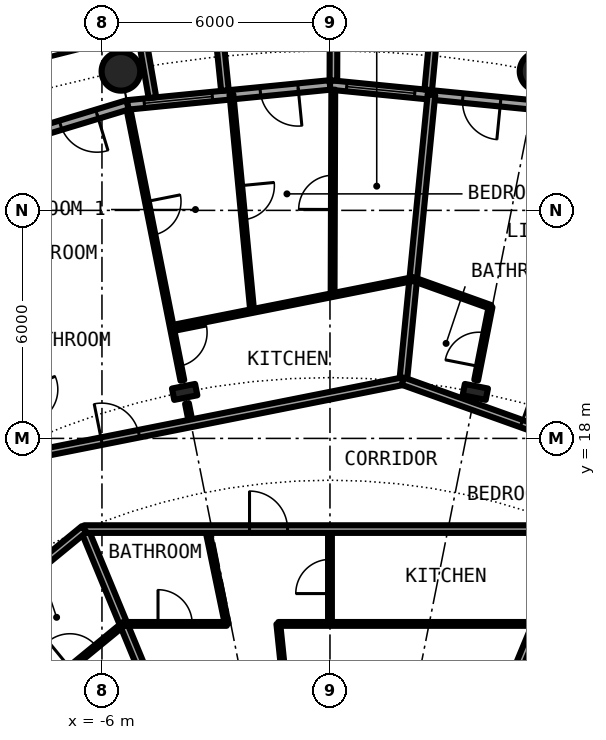
"""IFC4 building model, lengths in metres.
Left out: names, types, materials, properties, quantities, classifications, styles, units other than length and angle.
Written with IfcOpenShell. Run it as: python <this file> out.ifc"""

import sys

from ifc_helpers import new_model, si_unit, direction, frame, frame_2d, origin, origin_2d, place, context, subcontext, project, spatial, rectangle, hollow_circle, i_section, extrude, element, fill, save


model = new_model("IFC4")
c1 = context("Model", 3, precision=1e-05, world=origin(), true_north=direction((0.0, 1.0)))
c2 = subcontext(c1, "Body", "Model", "MODEL_VIEW")
j1 = project(units=[si_unit("LENGTHUNIT", "METRE"), si_unit("PLANEANGLEUNIT", "RADIAN")], contexts=[c1])
p1 = place(None, origin())
s1 = spatial("IfcSite", under=j1, at=p1, CompositionType="ELEMENT")
p2 = place(p1, origin())
s2 = spatial("IfcBuilding", under=s1, at=p2, CompositionType="ELEMENT")
p3 = place(p2, frame((0.0, 0.0, 35.0)))
s3 = spatial("IfcBuildingStorey", under=s2, at=p3, CompositionType="ELEMENT", Elevation=35.0)
for number, where, z_axis, x_axis in (
    (1, (5.501, 27.658, 0.0), (0.0, 0.0, 1.0), (1.0, 0.0, 0.0)),
    (2, (-5.501, 27.658, 0.0), (0.0, 0.0, 1.0), (1.0, 0.0, 0.0)),
):
    element("IfcColumn", number, at=place(p3, frame(where, z_axis=z_axis, x_axis=x_axis)), inside=s3, PredefinedType="COLUMN", context=c2, shape_type="SweptSolid", body=[
        extrude(hollow_circle(Radius=0.508, WallThickness=0.05, at=origin_2d()), origin(), (0.0, 0.0, 1.0), 3.05),
    ])
for number, where, z_axis, x_axis in (
    (3, (3.824, 19.223, 0.0), (0.0, 0.0, 1.0), (0.195, 0.981, 0.0)),
    (4, (-3.824, 19.223, 0.0), (0.0, 0.0, 1.0), (-0.195, 0.981, 0.0)),
):
    element("IfcColumn", number, at=place(p3, frame(where, z_axis=z_axis, x_axis=x_axis)), inside=s3, PredefinedType="COLUMN", context=c2, shape_type="SweptSolid", body=[
        extrude(i_section(OverallWidth=0.305, OverallDepth=0.62, WebThickness=0.021, FlangeThickness=0.04, FilletRadius=0.027, at=origin_2d()), origin(), (0.0, 0.0, 1.0), 3.05),
    ])
p4 = place(p3, frame((5.326, 26.775, 0.0), z_axis=(0.0, 0.0, 1.0), x_axis=(-0.995173996315, 0.098126026407, 0.0)))
e5 = element("IfcWall", 5, at=p4, inside=s3, PredefinedType="SOLIDWALL", context=c2, shape_type="SweptSolid", body=[
    extrude(rectangle(XDim=5.352, YDim=0.25, at=frame_2d((2.676, 0.0))), origin(), (0.0, 0.0, 1.0), 2.7),
])
p5 = place(p4, frame((0.841, 0.0, 0.0)))
e6 = element("IfcOpeningElement", 6, at=p5, cuts=e5, PredefinedType="OPENING", context=c2, shape_type="SweptSolid", body=[
    extrude(rectangle(XDim=1.0, YDim=2.2, at=frame_2d((0.5, 1.1))), frame((0.0, 0.135, 0.0), z_axis=(0.0, -1.0, 0.0), x_axis=(1.0, 0.0, 0.0)), (0.0, 0.0, 1.0), 0.27),
])
p6 = place(p4, frame((3.111, 0.0, 0.3)))
e7 = element("IfcOpeningElement", 7, at=p6, cuts=e5, PredefinedType="OPENING", context=c2, shape_type="SweptSolid", body=[
    extrude(rectangle(XDim=1.8, YDim=2.1, at=frame_2d((0.9, 1.05))), frame((0.0, 0.135, 0.0), z_axis=(0.0, -1.0, 0.0), x_axis=(1.0, 0.0, 0.0)), (0.0, 0.0, 1.0), 0.27),
])
p7 = place(p3, frame((2.586, 27.171, -0.03), z_axis=(0.0, 0.0, 1.0), x_axis=(0.094548432284, 0.995520262954, 0.0)))
e8 = element("IfcWall", 8, at=p7, inside=s3, PredefinedType="SOLIDWALL", context=c2, shape_type="SweptSolid", body=[
    extrude(rectangle(XDim=3.006, YDim=0.2, at=frame_2d((1.503, 0.0))), origin(), (0.0, 0.0, 1.0), 2.73),
])
p8 = place(p3, frame((0.09, 27.417, -0.03), z_axis=(0.0, 0.0, 1.0), x_axis=(0.00347308367, 0.999993968827, 0.0)))
e9 = element("IfcWall", 9, at=p8, inside=s3, PredefinedType="SOLIDWALL", context=c2, shape_type="SweptSolid", body=[
    extrude(rectangle(XDim=2.882, YDim=0.2, at=frame_2d((1.441, 0.0))), origin(), (0.0, 0.0, 1.0), 2.73),
])
p9 = place(p3, frame((0.0, 27.3, 0.0), z_axis=(0.0, 0.0, 1.0), x_axis=(-0.995173996315, -0.098126026407, 0.0)))
e10 = element("IfcWall", 10, at=p9, inside=s3, PredefinedType="SOLIDWALL", context=c2, shape_type="SweptSolid", body=[
    extrude(rectangle(XDim=5.352, YDim=0.25, at=frame_2d((2.676, 0.0))), origin(), (0.0, 0.0, 1.0), 2.7),
])
p10 = place(p9, frame((0.841, 0.0, 0.0)))
e11 = element("IfcOpeningElement", 11, at=p10, cuts=e10, PredefinedType="OPENING", context=c2, shape_type="SweptSolid", body=[
    extrude(rectangle(XDim=1.0, YDim=2.2, at=frame_2d((0.5, 1.1))), frame((0.0, 0.135, 0.0), z_axis=(0.0, -1.0, 0.0), x_axis=(1.0, 0.0, 0.0)), (0.0, 0.0, 1.0), 0.27),
])
p11 = place(p9, frame((3.111, 0.0, 0.3)))
e12 = element("IfcOpeningElement", 12, at=p11, cuts=e10, PredefinedType="OPENING", context=c2, shape_type="SweptSolid", body=[
    extrude(rectangle(XDim=1.8, YDim=2.1, at=frame_2d((0.9, 1.05))), frame((0.0, 0.135, 0.0), z_axis=(0.0, -1.0, 0.0), x_axis=(1.0, 0.0, 0.0)), (0.0, 0.0, 1.0), 0.27),
])
p12 = place(p3, frame((-2.764, 27.153, -0.03), z_axis=(0.0, 0.0, 1.0), x_axis=(-0.101505487237, 0.994834979311, 0.0)))
e13 = element("IfcWall", 13, at=p12, inside=s3, PredefinedType="SOLIDWALL", context=c2, shape_type="SweptSolid", body=[
    extrude(rectangle(XDim=3.007, YDim=0.2, at=frame_2d((1.503, 0.0))), origin(), (0.0, 0.0, 1.0), 2.73),
])
p13 = place(p3, frame((-4.671, 26.966, -0.03), z_axis=(0.0, 0.0, 1.0), x_axis=(-0.170539878907, 0.985350774954, 0.0)))
e14 = element("IfcWall", 14, at=p13, inside=s3, PredefinedType="SOLIDWALL", context=c2, shape_type="SweptSolid", body=[
    extrude(rectangle(XDim=2.932, YDim=0.2, at=frame_2d((1.466, 0.0))), origin(), (0.0, 0.0, 1.0), 2.73),
])
p14 = place(p3, frame((-5.326, 26.775, 0.0), z_axis=(0.0, 0.0, 1.0), x_axis=(-0.956965678721, -0.290201119486, 0.0)))
e15 = element("IfcWall", 15, at=p14, inside=s3, PredefinedType="SOLIDWALL", context=c2, shape_type="SweptSolid", body=[
    extrude(rectangle(XDim=5.351, YDim=0.25, at=frame_2d((2.676, 0.0))), origin(), (0.0, 0.0, 1.0), 2.7),
])
p15 = place(p14, frame((0.841, 0.0, 0.0)))
e16 = element("IfcOpeningElement", 16, at=p15, cuts=e15, PredefinedType="OPENING", context=c2, shape_type="SweptSolid", body=[
    extrude(rectangle(XDim=1.0, YDim=2.2, at=frame_2d((0.5, 1.1))), frame((0.0, 0.135, 0.0), z_axis=(0.0, -1.0, 0.0), x_axis=(1.0, 0.0, 0.0)), (0.0, 0.0, 1.0), 0.27),
])
p16 = place(p14, frame((3.111, 0.0, 0.3)))
e17 = element("IfcOpeningElement", 17, at=p16, cuts=e15, PredefinedType="OPENING", context=c2, shape_type="SweptSolid", body=[
    extrude(rectangle(XDim=1.8, YDim=2.1, at=frame_2d((0.9, 1.05))), frame((0.0, 0.135, 0.0), z_axis=(0.0, -1.0, 0.0), x_axis=(1.0, 0.0, 0.0)), (0.0, 0.0, 1.0), 0.27),
])
p17 = place(p3, frame((-6.467, 15.614, 0.0), z_axis=(0.0, 0.0, 1.0), x_axis=(0.382556139466, -0.923932248683, 0.0)))
e18 = element("IfcWall", 18, at=p17, inside=s3, PredefinedType="PARTITIONING", context=c2, shape_type="SweptSolid", body=[
    extrude(rectangle(XDim=9.18, YDim=0.2, at=frame_2d((4.59, 0.0))), origin(), (0.0, 0.0, 1.0), 2.7),
])
p18 = place(p3, frame((-5.301, 26.653, 0.0), z_axis=(0.0, 0.0, 1.0), x_axis=(0.19503038749, -0.980797200218, 0.0)))
e19 = element("IfcWall", 19, at=p18, inside=s3, PredefinedType="PARTITIONING", context=c2, shape_type="SweptSolid", body=[
    extrude(rectangle(XDim=7.265, YDim=0.1, at=frame_2d((3.633, 0.0))), origin(), (0.0, 0.0, 1.0), 2.7),
])
p19 = place(p18, frame((5.985, 0.0, 0.0)))
e20 = element("IfcOpeningElement", 20, at=p19, cuts=e19, PredefinedType="OPENING", context=c2, shape_type="SweptSolid", body=[
    extrude(rectangle(XDim=0.9, YDim=2.3, at=frame_2d((0.45, 1.15))), frame((0.0, 0.06, 0.0), z_axis=(0.0, -1.0, 0.0), x_axis=(1.0, 0.0, 0.0)), (0.0, 0.0, 1.0), 0.12),
])
p20 = place(p18, frame((2.467, 0.0, 0.0)))
e21 = element("IfcOpeningElement", 21, at=p20, cuts=e19, PredefinedType="OPENING", context=c2, shape_type="SweptSolid", body=[
    extrude(rectangle(XDim=0.9, YDim=2.3, at=frame_2d((0.45, 1.15))), frame((0.0, 0.06, 0.0), z_axis=(0.0, -1.0, 0.0), x_axis=(1.0, 0.0, 0.0)), (0.0, 0.0, 1.0), 0.12),
])
p21 = place(p3, frame((-3.763, 18.919, 0.0), z_axis=(0.0, 0.0, 1.0), x_axis=(0.195059361677, -0.98079143829, 0.0)))
e22 = element("IfcWall", 22, at=p21, inside=s3, PredefinedType="PARTITIONING", context=c2, shape_type="SweptSolid", body=[
    extrude(rectangle(XDim=0.533, YDim=0.1, at=frame_2d((0.267, 0.0))), origin(), (0.0, 0.0, 1.0), 2.7),
])
p22 = place(p3, frame((-3.234, 15.614, 0.0), z_axis=(0.0, 0.0, 1.0), x_axis=(0.202836883315, -0.97921254014, 0.0)))
e23 = element("IfcWall", 23, at=p22, inside=s3, PredefinedType="PARTITIONING", context=c2, shape_type="SweptSolid", body=[
    extrude(rectangle(XDim=2.548, YDim=0.1, at=frame_2d((1.274, 0.0))), origin(), (0.0, 0.0, 1.0), 2.7),
])
p23 = place(p3, frame((-2.593, 27.051, 0.0), z_axis=(0.0, 0.0, 1.0), x_axis=(0.095336244636, -0.995445126794, 0.0)))
e24 = element("IfcWall", 24, at=p23, inside=s3, PredefinedType="PARTITIONING", context=c2, shape_type="SweptSolid", body=[
    extrude(rectangle(XDim=5.726, YDim=0.1, at=frame_2d((2.863, 0.0))), origin(), (0.0, 0.0, 1.0), 2.7),
])
p24 = place(p23, frame((2.413, 0.0, 0.0)))
e25 = element("IfcOpeningElement", 25, at=p24, cuts=e24, PredefinedType="OPENING", context=c2, shape_type="SweptSolid", body=[
    extrude(rectangle(XDim=0.9, YDim=2.3, at=frame_2d((0.45, 1.15))), frame((0.0, 0.06, 0.0), z_axis=(0.0, -1.0, 0.0), x_axis=(1.0, 0.0, 0.0)), (0.0, 0.0, 1.0), 0.12),
])
p25 = place(p3, frame((-1.359, 13.119, 0.0), z_axis=(0.0, 0.0, 1.0), x_axis=(0.103118462411, -0.994669082012, 0.0)))
e26 = element("IfcWall", 26, at=p25, inside=s3, PredefinedType="PARTITIONING", context=c2, shape_type="SweptSolid", body=[
    extrude(rectangle(XDim=5.469, YDim=0.1, at=frame_2d((2.734, 0.0))), origin(), (0.0, 0.0, 1.0), 2.7),
])
p26 = place(p25, frame((2.285, 0.0, 0.0)))
e27 = element("IfcOpeningElement", 27, at=p26, cuts=e26, PredefinedType="OPENING", context=c2, shape_type="SweptSolid", body=[
    extrude(rectangle(XDim=0.9, YDim=2.3, at=frame_2d((0.45, 1.15))), frame((0.0, 0.06, 0.0), z_axis=(0.0, -1.0, 0.0), x_axis=(1.0, 0.0, 0.0)), (0.0, 0.0, 1.0), 0.12),
])
p27 = place(p3, frame((0.0, 13.119, 0.0), z_axis=(0.0, 0.0, 1.0), x_axis=(0.0, 1.0, 0.0)))
e28 = element("IfcWall", 28, at=p27, inside=s3, PredefinedType="PARTITIONING", context=c2, shape_type="SweptSolid", body=[
    extrude(rectangle(XDim=2.495, YDim=0.1, at=frame_2d((1.248, 0.0))), origin(), (0.0, 0.0, 1.0), 2.7),
])
p28 = place(p27, frame((0.798, 0.0, 0.0)))
e29 = element("IfcOpeningElement", 29, at=p28, cuts=e28, PredefinedType="OPENING", context=c2, shape_type="SweptSolid", body=[
    extrude(rectangle(XDim=0.9, YDim=2.3, at=frame_2d((0.45, 1.15))), frame((0.0, 0.06, 0.0), z_axis=(0.0, -1.0, 0.0), x_axis=(1.0, 0.0, 0.0)), (0.0, 0.0, 1.0), 0.12),
])
p29 = place(p3, frame((0.069, 21.772, 0.0), z_axis=(0.0, 0.0, 1.0), x_axis=(0.003298522564, 0.99999455986, 0.0)))
e30 = element("IfcWall", 30, at=p29, inside=s3, PredefinedType="PARTITIONING", context=c2, shape_type="SweptSolid", body=[
    extrude(rectangle(XDim=5.403, YDim=0.1, at=frame_2d((2.702, 0.0))), origin(), (0.0, 0.0, 1.0), 2.7),
])
p30 = place(p29, frame((2.252, 0.0, 0.0)))
e31 = element("IfcOpeningElement", 31, at=p30, cuts=e30, PredefinedType="OPENING", context=c2, shape_type="SweptSolid", body=[
    extrude(rectangle(XDim=0.9, YDim=2.3, at=frame_2d((0.45, 1.15))), frame((0.0, 0.06, 0.0), z_axis=(0.0, -1.0, 0.0), x_axis=(1.0, 0.0, 0.0)), (0.0, 0.0, 1.0), 0.12),
])
p31 = place(p3, frame((1.926, 19.505, 0.0), z_axis=(0.0, 0.0, 1.0), x_axis=(0.098208010272, 0.995165909142, 0.0)))
e32 = element("IfcWall", 32, at=p31, inside=s3, PredefinedType="PARTITIONING", context=c2, shape_type="SweptSolid", body=[
    extrude(rectangle(XDim=7.575, YDim=0.2, at=frame_2d((3.787, 0.0))), origin(), (0.0, 0.0, 1.0), 2.7),
])
p32 = place(p3, frame((2.955, 7.132, 0.0), z_axis=(0.0, 0.0, 1.0), x_axis=(0.382556139466, 0.923932248683, 0.0)))
e33 = element("IfcWall", 33, at=p32, inside=s3, PredefinedType="PARTITIONING", context=c2, shape_type="SweptSolid", body=[
    extrude(rectangle(XDim=9.18, YDim=0.2, at=frame_2d((4.59, 0.0))), origin(), (0.0, 0.0, 1.0), 2.7),
])
p33 = place(p3, frame((3.847, 19.535, 0.0), z_axis=(0.0, 0.0, 1.0), x_axis=(0.193055213522, 0.981187894611, 0.0)))
e34 = element("IfcWall", 34, at=p33, inside=s3, PredefinedType="PARTITIONING", context=c2, shape_type="SweptSolid", body=[
    extrude(rectangle(XDim=1.964, YDim=0.1, at=frame_2d((0.982, 0.0))), origin(), (0.0, 0.0, 1.0), 2.7),
])
p34 = place(p33, frame((0.366, 0.0, 0.0)))
e35 = element("IfcOpeningElement", 35, at=p34, cuts=e34, PredefinedType="OPENING", context=c2, shape_type="SweptSolid", body=[
    extrude(rectangle(XDim=0.9, YDim=2.3, at=frame_2d((0.45, 1.15))), frame((0.0, 0.06, 0.0), z_axis=(0.0, -1.0, 0.0), x_axis=(1.0, 0.0, 0.0)), (0.0, 0.0, 1.0), 0.12),
])
p35 = place(p3, frame((-5.434, 13.119, 0.0), z_axis=(0.0, 0.0, 1.0), x_axis=(1.0, 0.0, 0.0)))
e36 = element("IfcWall", 36, at=p35, inside=s3, PredefinedType="PARTITIONING", context=c2, shape_type="SweptSolid", body=[
    extrude(rectangle(XDim=2.717, YDim=0.1, at=frame_2d((1.358, 0.0))), origin(), (0.0, 0.0, 1.0), 2.7),
])
p36 = place(p35, frame((0.909, 0.0, 0.0)))
e37 = element("IfcOpeningElement", 37, at=p36, cuts=e36, PredefinedType="OPENING", context=c2, shape_type="SweptSolid", body=[
    extrude(rectangle(XDim=0.9, YDim=2.3, at=frame_2d((0.45, 1.15))), frame((0.0, 0.06, 0.0), z_axis=(0.0, -1.0, 0.0), x_axis=(1.0, 0.0, 0.0)), (0.0, 0.0, 1.0), 0.12),
])
p37 = place(p3, frame((-1.359, 13.119, 0.0), z_axis=(0.0, 0.0, 1.0), x_axis=(1.0, 0.0, 0.0)))
e38 = element("IfcWall", 38, at=p37, inside=s3, PredefinedType="PARTITIONING", context=c2, shape_type="SweptSolid", body=[
    extrude(rectangle(XDim=6.793, YDim=0.1, at=frame_2d((3.396, 0.0))), origin(), (0.0, 0.0, 1.0), 2.7),
])
p38 = place(p3, frame((-7.552, 11.379, 0.0), z_axis=(0.0, 0.0, 1.0), x_axis=(0.773323547924, 0.634011585246, 0.0)))
e39 = element("IfcWall", 39, at=p38, inside=s3, PredefinedType="PARTITIONING", context=c2, shape_type="SweptSolid", body=[
    extrude(rectangle(XDim=2.748, YDim=0.1, at=frame_2d((1.374, 0.0))), origin(), (0.0, 0.0, 1.0), 2.7),
])
p39 = place(p38, frame((0.917, 0.0, 0.0)))
e40 = element("IfcOpeningElement", 40, at=p39, cuts=e39, PredefinedType="OPENING", context=c2, shape_type="SweptSolid", body=[
    extrude(rectangle(XDim=0.9, YDim=2.3, at=frame_2d((0.45, 1.15))), frame((0.0, 0.06, 0.0), z_axis=(0.0, -1.0, 0.0), x_axis=(1.0, 0.0, 0.0)), (0.0, 0.0, 1.0), 0.12),
])
p40 = place(p3, frame((-6.467, 15.614, 0.0), z_axis=(0.0, 0.0, 1.0), x_axis=(1.0, 0.0, 0.0)))
e41 = element("IfcWall", 41, at=p40, inside=s3, PredefinedType="PARTITIONING", context=c2, shape_type="SweptSolid", body=[
    extrude(rectangle(XDim=12.934, YDim=0.2, at=frame_2d((6.467, 0.0))), origin(), (0.0, 0.0, 1.0), 2.7),
])
p41 = place(p40, frame((4.35, 0.0, 0.0)))
e42 = element("IfcOpeningElement", 42, at=p41, cuts=e41, PredefinedType="OPENING", context=c2, shape_type="SweptSolid", body=[
    extrude(rectangle(XDim=1.0, YDim=2.3, at=frame_2d((0.5, 1.15))), frame((0.0, 0.11, 0.0), z_axis=(0.0, -1.0, 0.0), x_axis=(1.0, 0.0, 0.0)), (0.0, 0.0, 1.0), 0.22),
])
p42 = place(p3, frame((-14.039, 9.4, 0.0), z_axis=(0.0, 0.0, 1.0), x_axis=(0.77298340166, 0.634426245326, 0.0)))
e43 = element("IfcWall", 43, at=p42, inside=s3, PredefinedType="PARTITIONING", context=c2, shape_type="SweptSolid", body=[
    extrude(rectangle(XDim=9.793, YDim=0.2, at=frame_2d((4.896, 0.0))), origin(), (0.0, 0.0, 1.0), 2.7),
])
p43 = place(p42, frame((4.389, 0.0, 0.0)))
e44 = element("IfcOpeningElement", 44, at=p43, cuts=e43, PredefinedType="OPENING", context=c2, shape_type="SweptSolid", body=[
    extrude(rectangle(XDim=1.0, YDim=2.3, at=frame_2d((0.5, 1.15))), frame((0.0, 0.11, 0.0), z_axis=(0.0, -1.0, 0.0), x_axis=(1.0, 0.0, 0.0)), (0.0, 0.0, 1.0), 0.22),
])
p44 = place(p3, frame((-9.239, 17.286, 0.0), z_axis=(0.0, 0.0, 1.0), x_axis=(0.98077905287, 0.195121627328, 0.0)))
e45 = element("IfcWall", 45, at=p44, inside=s3, PredefinedType="PARTITIONING", context=c2, shape_type="SweptSolid", body=[
    extrude(rectangle(XDim=11.379, YDim=0.2, at=frame_2d((5.689, 0.0))), origin(), (0.0, 0.0, 1.0), 2.38),
])
p45 = place(p44, frame((3.293, 0.0, 0.0)))
e46 = element("IfcOpeningElement", 46, at=p45, cuts=e45, PredefinedType="OPENING", context=c2, shape_type="SweptSolid", body=[
    extrude(rectangle(XDim=1.0, YDim=2.3, at=frame_2d((0.5, 1.15))), frame((0.0, 0.11, 0.0), z_axis=(0.0, -1.0, 0.0), x_axis=(1.0, 0.0, 0.0)), (0.0, 0.0, 1.0), 0.22),
])
p46 = place(p3, frame((1.918, 19.506, 0.0), z_axis=(0.0, 0.0, 1.0), x_axis=(0.941574977747, -0.336803446065, 0.0)))
e47 = element("IfcWall", 47, at=p46, inside=s3, PredefinedType="PARTITIONING", context=c2, shape_type="SweptSolid", body=[
    extrude(rectangle(XDim=9.37, YDim=0.2, at=frame_2d((4.685, 0.0))), origin(), (0.0, 0.0, 1.0), 2.38),
])
p47 = place(p46, frame((3.313, 0.0, 0.0)))
e48 = element("IfcOpeningElement", 48, at=p47, cuts=e47, PredefinedType="OPENING", context=c2, shape_type="SweptSolid", body=[
    extrude(rectangle(XDim=1.0, YDim=2.3, at=frame_2d((0.5, 1.15))), frame((0.0, 0.11, 0.0), z_axis=(0.0, -1.0, 0.0), x_axis=(1.0, 0.0, 0.0)), (0.0, 0.0, 1.0), 0.22),
])
p48 = place(p3, frame((-4.163, 20.93, 0.0), z_axis=(0.0, 0.0, 1.0), x_axis=(0.98077745026, 0.195129682675, 0.0)))
e49 = element("IfcWall", 49, at=p48, inside=s3, PredefinedType="PARTITIONING", context=c2, shape_type="SweptSolid", body=[
    extrude(rectangle(XDim=6.474, YDim=0.1, at=frame_2d((3.237, 0.0))), origin(), (0.0, 0.0, 1.0), 2.7),
])
p49 = place(p3, frame((2.186, 22.193, 0.0), z_axis=(0.0, 0.0, 1.0), x_axis=(0.941358984217, -0.337406672777, 0.0)))
e50 = element("IfcWall", 50, at=p49, inside=s3, PredefinedType="PARTITIONING", context=c2, shape_type="SweptSolid", body=[
    extrude(rectangle(XDim=2.167, YDim=0.1, at=frame_2d((1.083, 0.0))), origin(), (0.0, 0.0, 1.0), 2.7),
])
p50 = place(p5, origin())
e51 = element("IfcDoor", 51, at=p50, inside=s3, OperationType="SINGLE_SWING_LEFT", PredefinedType="DOOR", context=c2, shape_type="SweptSolid", body=[
    extrude(rectangle(XDim=1.0, YDim=2.2, at=frame_2d((0.5, 1.1))), frame((0.0, 0.025, 0.0), z_axis=(0.0, -1.0, 0.0), x_axis=(1.0, 0.0, 0.0)), (0.0, 0.0, 1.0), 0.05),
])
fill(e6, e51)
p51 = place(p6, origin())
e52 = element("IfcWindow", 52, at=p51, inside=s3, PartitioningType="SINGLE_PANEL", PredefinedType="WINDOW", context=c2, shape_type="SweptSolid", body=[
    extrude(rectangle(XDim=1.8, YDim=2.1, at=frame_2d((0.9, 1.05))), frame((0.0, 0.03, 0.0), z_axis=(0.0, -1.0, 0.0), x_axis=(1.0, 0.0, 0.0)), (0.0, 0.0, 1.0), 0.06),
])
fill(e7, e52)
p52 = place(p10, origin())
e53 = element("IfcDoor", 53, at=p52, inside=s3, OperationType="SINGLE_SWING_LEFT", PredefinedType="DOOR", context=c2, shape_type="SweptSolid", body=[
    extrude(rectangle(XDim=1.0, YDim=2.2, at=frame_2d((0.5, 1.1))), frame((0.0, 0.025, 0.0), z_axis=(0.0, -1.0, 0.0), x_axis=(1.0, 0.0, 0.0)), (0.0, 0.0, 1.0), 0.05),
])
fill(e11, e53)
p53 = place(p11, origin())
e54 = element("IfcWindow", 54, at=p53, inside=s3, PartitioningType="SINGLE_PANEL", PredefinedType="WINDOW", context=c2, shape_type="SweptSolid", body=[
    extrude(rectangle(XDim=1.8, YDim=2.1, at=frame_2d((0.9, 1.05))), frame((0.0, 0.03, 0.0), z_axis=(0.0, -1.0, 0.0), x_axis=(1.0, 0.0, 0.0)), (0.0, 0.0, 1.0), 0.06),
])
fill(e12, e54)
p54 = place(p15, origin())
e55 = element("IfcDoor", 55, at=p54, inside=s3, OperationType="SINGLE_SWING_LEFT", PredefinedType="DOOR", context=c2, shape_type="SweptSolid", body=[
    extrude(rectangle(XDim=1.0, YDim=2.2, at=frame_2d((0.5, 1.1))), frame((0.0, 0.025, 0.0), z_axis=(0.0, -1.0, 0.0), x_axis=(1.0, 0.0, 0.0)), (0.0, 0.0, 1.0), 0.05),
])
fill(e16, e55)
p55 = place(p47, origin())
e56 = element("IfcDoor", 56, at=p55, inside=s3, OperationType="SINGLE_SWING_LEFT", PredefinedType="DOOR", context=c2, shape_type="SweptSolid", body=[
    extrude(rectangle(XDim=1.0, YDim=2.3, at=frame_2d((0.5, 1.15))), frame((0.0, 0.025, 0.0), z_axis=(0.0, -1.0, 0.0), x_axis=(1.0, 0.0, 0.0)), (0.0, 0.0, 1.0), 0.05),
])
fill(e48, e56)
p56 = place(p34, origin())
e57 = element("IfcDoor", 57, at=p56, inside=s3, OperationType="SINGLE_SWING_LEFT", PredefinedType="DOOR", context=c2, shape_type="SweptSolid", body=[
    extrude(rectangle(XDim=0.9, YDim=2.3, at=frame_2d((0.45, 1.15))), frame((0.0, 0.025, 0.0), z_axis=(0.0, -1.0, 0.0), x_axis=(1.0, 0.0, 0.0)), (0.0, 0.0, 1.0), 0.05),
])
fill(e35, e57)
p57 = place(p45, origin())
e58 = element("IfcDoor", 58, at=p57, inside=s3, OperationType="SINGLE_SWING_LEFT", PredefinedType="DOOR", context=c2, shape_type="SweptSolid", body=[
    extrude(rectangle(XDim=1.0, YDim=2.3, at=frame_2d((0.5, 1.15))), frame((0.0, 0.025, 0.0), z_axis=(0.0, -1.0, 0.0), x_axis=(1.0, 0.0, 0.0)), (0.0, 0.0, 1.0), 0.05),
])
fill(e46, e58)
p58 = place(p19, origin())
e59 = element("IfcDoor", 59, at=p58, inside=s3, OperationType="SINGLE_SWING_RIGHT", PredefinedType="DOOR", context=c2, shape_type="SweptSolid", body=[
    extrude(rectangle(XDim=0.9, YDim=2.3, at=frame_2d((0.45, 1.15))), frame((0.0, 0.025, 0.0), z_axis=(0.0, -1.0, 0.0), x_axis=(1.0, 0.0, 0.0)), (0.0, 0.0, 1.0), 0.05),
])
fill(e20, e59)
p59 = place(p20, origin())
e60 = element("IfcDoor", 60, at=p59, inside=s3, OperationType="SINGLE_SWING_LEFT", PredefinedType="DOOR", context=c2, shape_type="SweptSolid", body=[
    extrude(rectangle(XDim=0.9, YDim=2.3, at=frame_2d((0.45, 1.15))), frame((0.0, 0.025, 0.0), z_axis=(0.0, -1.0, 0.0), x_axis=(1.0, 0.0, 0.0)), (0.0, 0.0, 1.0), 0.05),
])
fill(e21, e60)
p60 = place(p24, origin())
e61 = element("IfcDoor", 61, at=p60, inside=s3, OperationType="SINGLE_SWING_LEFT", PredefinedType="DOOR", context=c2, shape_type="SweptSolid", body=[
    extrude(rectangle(XDim=0.9, YDim=2.3, at=frame_2d((0.45, 1.15))), frame((0.0, 0.025, 0.0), z_axis=(0.0, -1.0, 0.0), x_axis=(1.0, 0.0, 0.0)), (0.0, 0.0, 1.0), 0.05),
])
fill(e25, e61)
p61 = place(p30, origin())
e62 = element("IfcDoor", 62, at=p61, inside=s3, OperationType="SINGLE_SWING_LEFT", PredefinedType="DOOR", context=c2, shape_type="SweptSolid", body=[
    extrude(rectangle(XDim=0.9, YDim=2.3, at=frame_2d((0.45, 1.15))), frame((0.0, 0.025, 0.0), z_axis=(0.0, -1.0, 0.0), x_axis=(1.0, 0.0, 0.0)), (0.0, 0.0, 1.0), 0.05),
])
fill(e31, e62)
p62 = place(p41, origin())
e63 = element("IfcDoor", 63, at=p62, inside=s3, OperationType="SINGLE_SWING_LEFT", PredefinedType="DOOR", context=c2, shape_type="SweptSolid", body=[
    extrude(rectangle(XDim=1.0, YDim=2.3, at=frame_2d((0.5, 1.15))), frame((0.0, 0.025, 0.0), z_axis=(0.0, -1.0, 0.0), x_axis=(1.0, 0.0, 0.0)), (0.0, 0.0, 1.0), 0.05),
])
fill(e42, e63)
p63 = place(p36, origin())
e64 = element("IfcDoor", 64, at=p63, inside=s3, OperationType="SINGLE_SWING_RIGHT", PredefinedType="DOOR", context=c2, shape_type="SweptSolid", body=[
    extrude(rectangle(XDim=0.9, YDim=2.3, at=frame_2d((0.45, 1.15))), frame((0.0, 0.025, 0.0), z_axis=(0.0, -1.0, 0.0), x_axis=(1.0, 0.0, 0.0)), (0.0, 0.0, 1.0), 0.05),
])
fill(e37, e64)
p64 = place(p28, origin())
e65 = element("IfcDoor", 65, at=p64, inside=s3, OperationType="SINGLE_SWING_RIGHT", PredefinedType="DOOR", context=c2, shape_type="SweptSolid", body=[
    extrude(rectangle(XDim=0.9, YDim=2.3, at=frame_2d((0.45, 1.15))), frame((0.0, 0.025, 0.0), z_axis=(0.0, -1.0, 0.0), x_axis=(1.0, 0.0, 0.0)), (0.0, 0.0, 1.0), 0.05),
])
fill(e29, e65)
p65 = place(p39, origin())
e66 = element("IfcDoor", 66, at=p65, inside=s3, OperationType="SINGLE_SWING_LEFT", PredefinedType="DOOR", context=c2, shape_type="SweptSolid", body=[
    extrude(rectangle(XDim=0.9, YDim=2.3, at=frame_2d((0.45, 1.15))), frame((0.0, 0.025, 0.0), z_axis=(0.0, -1.0, 0.0), x_axis=(1.0, 0.0, 0.0)), (0.0, 0.0, 1.0), 0.05),
])
fill(e40, e66)
save(model, sys.argv[1])
